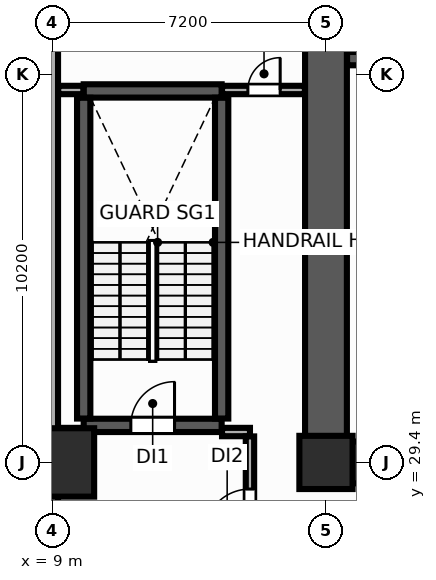
"""IFC4 building model, lengths in metres.
Left out: names, types, materials, properties, quantities, classifications, styles, units other than length and angle.
Written with IfcOpenShell. Run it as: python <this file> out.ifc"""

import sys

from ifc_helpers import new_model, si_unit, direction, frame, frame_2d, origin, origin_2d, place, context, subcontext, project, spatial, rectangle, extrude, element, fill, save


model = new_model("IFC4")
c1 = context("Model", 3, precision=1e-05, world=origin(), true_north=direction((0.0, 1.0)))
c2 = subcontext(c1, "Body", "Model", "MODEL_VIEW")
j1 = project(units=[si_unit("LENGTHUNIT", "METRE"), si_unit("PLANEANGLEUNIT", "RADIAN")], contexts=[c1])
p1 = place(None, origin())
s1 = spatial("IfcSite", under=j1, at=p1, CompositionType="ELEMENT")
p2 = place(p1, origin())
s2 = spatial("IfcBuilding", under=s1, at=p2, CompositionType="ELEMENT")
p3 = place(p2, origin())
s3 = spatial("IfcBuildingStorey", under=s2, at=p3, CompositionType="ELEMENT", Elevation=0.0)
p4 = place(p3, frame((9.0, 29.4, 0.0), z_axis=(0.0, 0.0, 1.0), x_axis=(1.0, 0.0, 0.0)))
e1 = element("IfcColumn", 1, at=p4, inside=s3, PredefinedType="USERDEFINED", context=c2, shape_type="SweptSolid", body=[
    extrude(rectangle(XDim=2.2, YDim=1.8, at=origin_2d()), origin(), (0.0, 0.0, 1.0), 7.68),
])
p5 = place(p3, frame((16.2, 29.4, 0.0), z_axis=(0.0, 0.0, 1.0), x_axis=(1.0, 0.0, 0.0)))
e2 = element("IfcColumn", 2, at=p5, inside=s3, PredefinedType="COLUMN", context=c2, shape_type="SweptSolid", body=[
    extrude(rectangle(XDim=1.4, YDim=1.4, at=origin_2d()), origin(), (0.0, 0.0, 1.0), 7.68),
])
p6 = place(p3, frame((9.0, 47.5, 0.0), z_axis=(0.0, 0.0, 1.0), x_axis=(0.0, -1.0, 0.0)))
e3 = element("IfcWall", 3, at=p6, inside=s3, PredefinedType="SOLIDWALL", context=c2, shape_type="SweptSolid", body=[
    extrude(rectangle(XDim=26.8, YDim=0.3, at=frame_2d((13.4, 0.0))), origin(), (0.0, 0.0, 1.0), 5.4),
])
p7 = place(p3, frame((16.2, 29.4, 0.0), z_axis=(0.0, 0.0, 1.0), x_axis=(0.0, 1.0, 0.0)))
e4 = element("IfcWall", 4, at=p7, inside=s3, PredefinedType="SHEAR", context=c2, shape_type="SweptSolid", body=[
    extrude(rectangle(XDim=19.2, YDim=1.1, at=frame_2d((9.6, 0.0))), origin(), (0.0, 0.0, 1.0), 7.68),
])
p8 = place(p3, frame((16.755, 29.4, 0.0), z_axis=(0.0, 0.0, 1.0), x_axis=(1.0, 0.0, 0.0)))
e5 = element("IfcWall", 5, at=p8, inside=s3, PredefinedType="SHEAR", context=c2, shape_type="SweptSolid", body=[
    extrude(rectangle(XDim=6.845, YDim=1.1, at=frame_2d((3.423, 0.0))), origin(), (0.0, 0.0, 1.0), 7.68),
])
p9 = place(p3, frame((16.755, 40.025, 0.0), z_axis=(0.0, 0.0, 1.0), x_axis=(1.0, 0.0, 0.0)))
e6 = element("IfcWall", 6, at=p9, inside=s3, PredefinedType="SHEAR", context=c2, shape_type="SweptSolid", body=[
    extrude(rectangle(XDim=4.1, YDim=0.35, at=frame_2d((2.05, 0.0))), origin(), (0.0, 0.0, 1.0), 7.68),
])
p10 = place(p9, frame((1.71, 0.0, 0.0)))
e7 = element("IfcOpeningElement", 7, at=p10, cuts=e6, PredefinedType="OPENING", context=c2, shape_type="SweptSolid", body=[
    extrude(rectangle(XDim=1.15, YDim=2.15, at=frame_2d((0.575, 1.075))), frame((0.0, 0.185, 0.0), z_axis=(0.0, -1.0, 0.0), x_axis=(1.0, 0.0, 0.0)), (0.0, 0.0, 1.0), 0.37),
])
p11 = place(p3, frame((9.825, 30.375, 0.0), z_axis=(0.0, 0.0, 1.0), x_axis=(1.0, 0.0, 0.0)))
e8 = element("IfcWall", 8, at=p11, inside=s3, PredefinedType="SHEAR", context=c2, shape_type="SweptSolid", body=[
    extrude(rectangle(XDim=3.63, YDim=0.35, at=frame_2d((1.815, 0.0))), origin(), (0.0, 0.0, 1.0), 7.68),
])
p12 = place(p11, frame((1.24, 0.0, 0.0)))
e9 = element("IfcOpeningElement", 9, at=p12, cuts=e8, PredefinedType="OPENING", context=c2, shape_type="SweptSolid", body=[
    extrude(rectangle(XDim=1.15, YDim=2.15, at=frame_2d((0.575, 1.075))), frame((0.0, 0.185, 0.0), z_axis=(0.0, -1.0, 0.0), x_axis=(1.0, 0.0, 0.0)), (0.0, 0.0, 1.0), 0.37),
])
p13 = place(p3, frame((9.825, 39.175, 0.0), z_axis=(0.0, 0.0, 1.0), x_axis=(1.0, 0.0, 0.0)))
e10 = element("IfcWall", 10, at=p13, inside=s3, PredefinedType="SHEAR", context=c2, shape_type="SweptSolid", body=[
    extrude(rectangle(XDim=3.63, YDim=0.35, at=frame_2d((1.815, 0.0))), origin(), (0.0, 0.0, 1.0), 7.68),
])
for number, where, z_axis, x_axis in (
    (11, (9.825, 30.555, 0.0), (0.0, 0.0, 1.0), (0.0, 1.0, 0.0)),
    (12, (13.455, 30.555, 0.0), (0.0, 0.0, 1.0), (0.0, 1.0, 0.0)),
):
    element("IfcWall", number, at=place(p3, frame(where, z_axis=z_axis, x_axis=x_axis)), inside=s3, PredefinedType="SHEAR", context=c2, shape_type="SweptSolid", body=[
        extrude(rectangle(XDim=8.44, YDim=0.35, at=frame_2d((4.22, 0.0))), origin(), (0.0, 0.0, 1.0), 7.68),
    ])
p14 = place(p3, frame((9.155, 30.2, 0.0), z_axis=(0.0, 0.0, 1.0), x_axis=(1.0, 0.0, 0.0)))
e13 = element("IfcWall", 13, at=p14, inside=s3, PredefinedType="PARTITIONING", context=c2, shape_type="SweptSolid", body=[
    extrude(rectangle(XDim=0.66, YDim=0.22, at=frame_2d((0.33, 0.0))), origin(), (0.0, 0.0, 1.0), 7.68),
])
p15 = place(p3, frame((13.465, 30.2, 0.0), z_axis=(0.0, 0.0, 1.0), x_axis=(1.0, 0.0, 0.0)))
e14 = element("IfcWall", 14, at=p15, inside=s3, PredefinedType="PARTITIONING", context=c2, shape_type="SweptSolid", body=[
    extrude(rectangle(XDim=0.735, YDim=0.22, at=frame_2d((0.367, 0.0))), origin(), (0.0, 0.0, 1.0), 5.4),
])
p16 = place(p3, frame((14.2, 26.88, 0.0), z_axis=(0.0, 0.0, 1.0), x_axis=(0.0, 1.0, 0.0)))
e15 = element("IfcWall", 15, at=p16, inside=s3, PredefinedType="PARTITIONING", context=c2, shape_type="SweptSolid", body=[
    extrude(rectangle(XDim=3.205, YDim=0.22, at=frame_2d((1.603, 0.0))), origin(), (0.0, 0.0, 1.0), 7.68),
])
p17 = place(p16, frame((0.62, 0.0, 0.0)))
e16 = element("IfcOpeningElement", 16, at=p17, cuts=e15, PredefinedType="OPENING", context=c2, shape_type="SweptSolid", body=[
    extrude(rectangle(XDim=1.2, YDim=2.15, at=frame_2d((0.6, 1.075))), frame((0.0, 0.12, 0.0), z_axis=(0.0, -1.0, 0.0), x_axis=(1.0, 0.0, 0.0)), (0.0, 0.0, 1.0), 0.24),
])
p18 = place(p3, frame((9.155, 39.2, 0.0), z_axis=(0.0, 0.0, 1.0), x_axis=(1.0, 0.0, 0.0)))
e17 = element("IfcWall", 17, at=p18, inside=s3, PredefinedType="PARTITIONING", context=c2, shape_type="SweptSolid", body=[
    extrude(rectangle(XDim=0.66, YDim=0.22, at=frame_2d((0.33, 0.0))), origin(), (0.0, 0.0, 1.0), 7.68),
])
p19 = place(p3, frame((13.465, 39.2, 0.0), z_axis=(0.0, 0.0, 1.0), x_axis=(1.0, 0.0, 0.0)))
e18 = element("IfcWall", 18, at=p19, inside=s3, PredefinedType="PARTITIONING", context=c2, shape_type="SweptSolid", body=[
    extrude(rectangle(XDim=2.18, YDim=0.22, at=frame_2d((1.09, 0.0))), origin(), (0.0, 0.0, 1.0), 7.68),
])
p20 = place(p19, frame((0.68, 0.0, 0.0)))
e19 = element("IfcOpeningElement", 19, at=p20, cuts=e18, PredefinedType="OPENING", context=c2, shape_type="SweptSolid", body=[
    extrude(rectangle(XDim=0.85, YDim=2.1, at=frame_2d((0.425, 1.05))), frame((0.0, 0.12, 0.0), z_axis=(0.0, -1.0, 0.0), x_axis=(1.0, 0.0, 0.0)), (0.0, 0.0, 1.0), 0.24),
])
p21 = place(p12, origin())
e20 = element("IfcDoor", 20, at=p21, inside=s3, OperationType="SINGLE_SWING_RIGHT", PredefinedType="DOOR", context=c2, shape_type="SweptSolid", body=[
    extrude(rectangle(XDim=1.15, YDim=2.15, at=frame_2d((0.575, 1.075))), frame((0.0, 0.025, 0.0), z_axis=(0.0, -1.0, 0.0), x_axis=(1.0, 0.0, 0.0)), (0.0, 0.0, 1.0), 0.05),
])
fill(e9, e20)
p22 = place(p17, origin())
e21 = element("IfcDoor", 21, at=p22, inside=s3, OperationType="SINGLE_SWING_LEFT", PredefinedType="DOOR", context=c2, shape_type="SweptSolid", body=[
    extrude(rectangle(XDim=1.2, YDim=2.15, at=frame_2d((0.6, 1.075))), frame((0.0, 0.025, 0.0), z_axis=(0.0, -1.0, 0.0), x_axis=(1.0, 0.0, 0.0)), (0.0, 0.0, 1.0), 0.05),
])
fill(e16, e21)
p23 = place(p20, origin())
e22 = element("IfcDoor", 22, at=p23, inside=s3, OperationType="SINGLE_SWING_RIGHT", PredefinedType="DOOR", context=c2, shape_type="SweptSolid", body=[
    extrude(rectangle(XDim=0.85, YDim=2.1, at=frame_2d((0.425, 1.05))), frame((0.0, 0.025, 0.0), z_axis=(0.0, -1.0, 0.0), x_axis=(1.0, 0.0, 0.0)), (0.0, 0.0, 1.0), 0.05),
])
fill(e19, e22)
save(model, sys.argv[1])
